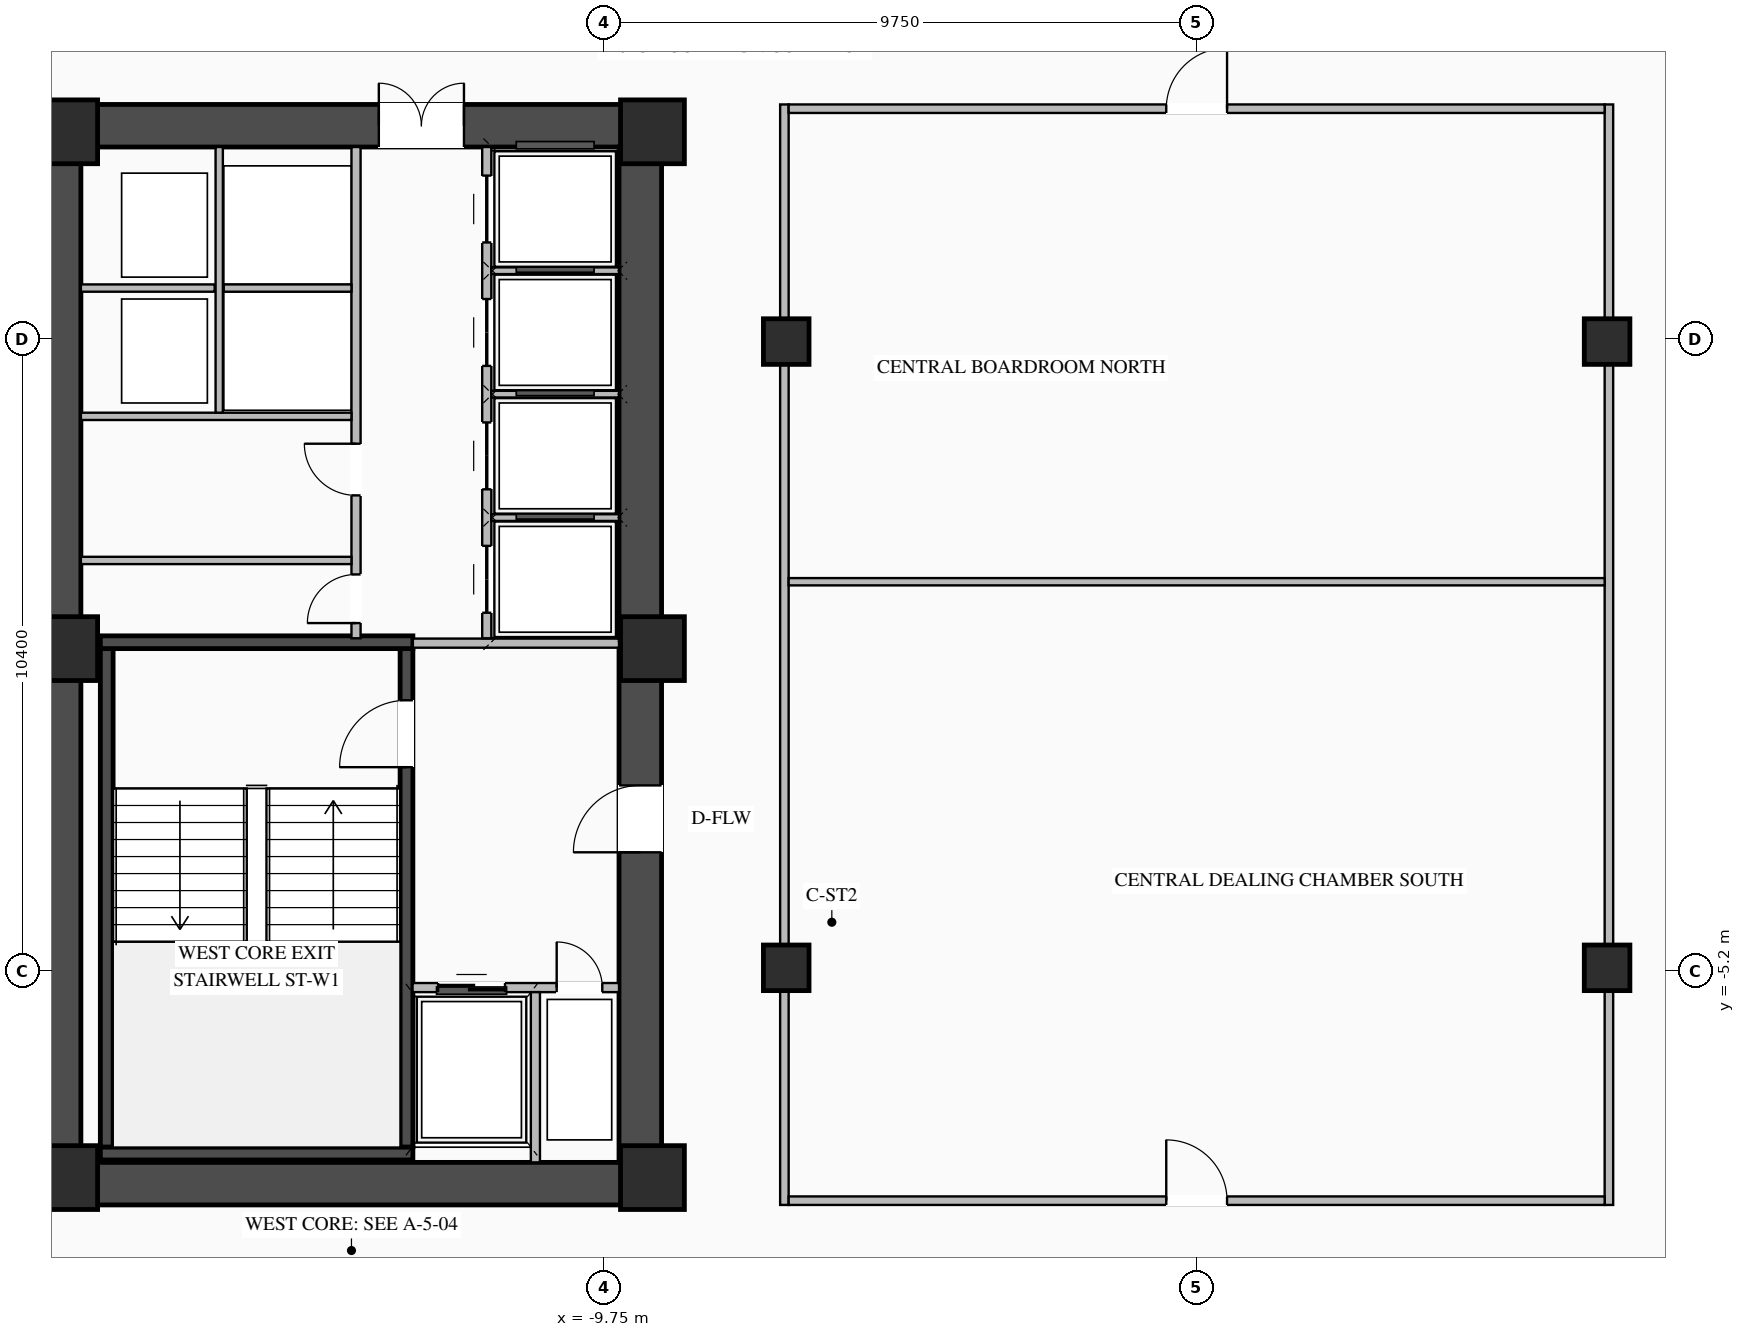
"""IFC4 building model, lengths in metres.
Left out: names, types, materials, properties, quantities, classifications, styles, units other than length and angle.
Written with IfcOpenShell. Run it as: python <this file> out.ifc"""

import sys

from ifc_helpers import new_model, si_unit, direction, frame, frame_2d, origin, origin_2d, place, context, subcontext, project, spatial, rectangle, i_section, extrude, element, fill, save


model = new_model("IFC4")
c1 = context("Model", 3, precision=1e-05, world=origin(), true_north=direction((0.0, 1.0)))
c2 = subcontext(c1, "Body", "Model", "MODEL_VIEW")
j1 = project(units=[si_unit("LENGTHUNIT", "METRE"), si_unit("PLANEANGLEUNIT", "RADIAN")], contexts=[c1])
p1 = place(None, origin())
s1 = spatial("IfcSite", under=j1, at=p1, CompositionType="ELEMENT")
p2 = place(p1, origin())
s2 = spatial("IfcBuilding", under=s1, at=p2, CompositionType="ELEMENT")
p3 = place(p2, frame((0.0, 0.0, 74.2)))
s3 = spatial("IfcBuildingStorey", under=s2, at=p3, CompositionType="ELEMENT", Elevation=74.2)
p4 = place(p3, frame((-19.05, -8.7, 0.0), z_axis=(0.0, 0.0, 1.0), x_axis=(1.0, 0.0, 0.0)))
e1 = element("IfcWall", 1, at=p4, inside=s3, PredefinedType="SHEAR", context=c2, shape_type="SweptSolid", body=[
    extrude(rectangle(XDim=10.25, YDim=0.7, at=frame_2d((5.125, 0.0))), origin(), (0.0, 0.0, 1.0), 3.27),
])
p5 = place(p3, frame((-19.05, 8.7, 0.0), z_axis=(0.0, 0.0, 1.0), x_axis=(1.0, 0.0, 0.0)))
e2 = element("IfcWall", 2, at=p5, inside=s3, PredefinedType="SHEAR", context=c2, shape_type="SweptSolid", body=[
    extrude(rectangle(XDim=10.25, YDim=0.7, at=frame_2d((5.125, 0.0))), origin(), (0.0, 0.0, 1.0), 3.27),
])
p6 = place(p5, frame((5.6, 0.0, 0.0)))
e3 = element("IfcOpeningElement", 3, at=p6, cuts=e2, PredefinedType="OPENING", context=c2, shape_type="SweptSolid", body=[
    extrude(rectangle(XDim=1.4, YDim=2.05, at=frame_2d((0.7, 1.025))), frame((0.0, 0.36, 0.0), z_axis=(0.0, -1.0, 0.0), x_axis=(1.0, 0.0, 0.0)), (0.0, 0.0, 1.0), 0.72),
])
p7 = place(p3, frame((-18.7, -8.35, 0.0), z_axis=(0.0, 0.0, 1.0), x_axis=(0.0, 1.0, 0.0)))
e4 = element("IfcWall", 4, at=p7, inside=s3, PredefinedType="SHEAR", context=c2, shape_type="SweptSolid", body=[
    extrude(rectangle(XDim=16.7, YDim=0.7, at=frame_2d((8.35, 0.0))), origin(), (0.0, 0.0, 1.0), 3.27),
])
p8 = place(p3, frame((-9.15, -8.35, 0.0), z_axis=(0.0, 0.0, 1.0), x_axis=(0.0, 1.0, 0.0)))
e5 = element("IfcWall", 5, at=p8, inside=s3, PredefinedType="SHEAR", context=c2, shape_type="SweptSolid", body=[
    extrude(rectangle(XDim=16.7, YDim=0.7, at=frame_2d((8.35, 0.0))), origin(), (0.0, 0.0, 1.0), 3.27),
])
p9 = place(p8, frame((5.1, 0.0, 0.0)))
e6 = element("IfcOpeningElement", 6, at=p9, cuts=e5, PredefinedType="OPENING", context=c2, shape_type="SweptSolid", body=[
    extrude(rectangle(XDim=1.1, YDim=2.08, at=frame_2d((0.55, 1.04))), frame((0.0, 0.36, 0.0), z_axis=(0.0, -1.0, 0.0), x_axis=(1.0, 0.0, 0.0)), (0.0, 0.0, 1.0), 0.72),
])
p10 = place(p3, frame((-12.995, -8.1, 0.0), z_axis=(0.0, 0.0, 1.0), x_axis=(0.0, 1.0, 0.0)))
e7 = element("IfcWall", 7, at=p10, inside=s3, PredefinedType="SHEAR", context=c2, shape_type="SweptSolid", body=[
    extrude(rectangle(XDim=8.2, YDim=0.21, at=frame_2d((4.1, 0.0))), origin(), (0.0, 0.0, 1.0), 3.27),
])
p11 = place(p10, frame((6.25, 0.0, 0.0)))
e8 = element("IfcOpeningElement", 8, at=p11, cuts=e7, PredefinedType="OPENING", context=c2, shape_type="SweptSolid", body=[
    extrude(rectangle(XDim=1.1, YDim=2.15, at=frame_2d((0.55, 1.075))), frame((0.0, 0.115, 0.0), z_axis=(0.0, -1.0, 0.0), x_axis=(1.0, 0.0, 0.0)), (0.0, 0.0, 1.0), 0.23),
])
p12 = place(p3, frame((-17.925, -8.1, 0.0), z_axis=(0.0, 0.0, 1.0), x_axis=(0.0, 1.0, 0.0)))
e9 = element("IfcWall", 9, at=p12, inside=s3, PredefinedType="SHEAR", context=c2, shape_type="SweptSolid", body=[
    extrude(rectangle(XDim=8.2, YDim=0.21, at=frame_2d((4.1, 0.0))), origin(), (0.0, 0.0, 1.0), 3.27),
])
for number, where, z_axis, x_axis in (
    (10, (-18.03, -8.205, 0.0), (0.0, 0.0, 1.0), (1.0, 0.0, 0.0)),
    (11, (-12.89, 0.205, 0.0), (0.0, 0.0, 1.0), (-1.0, 0.0, 0.0)),
):
    element("IfcWall", number, at=place(p3, frame(where, z_axis=z_axis, x_axis=x_axis)), inside=s3, PredefinedType="SHEAR", context=c2, shape_type="SweptSolid", body=[
        extrude(rectangle(XDim=5.14, YDim=0.21, at=frame_2d((2.57, 0.0))), origin(), (0.0, 0.0, 1.0), 3.27),
    ])
for number, where, z_axis, x_axis in (
    (12, (-8.95, -8.6, 0.0), (0.0, 0.0, 1.0), (1.0, 0.0, 0.0)),
    (13, (-8.95, 0.1, 0.0), (0.0, 0.0, 1.0), (1.0, 0.0, 0.0)),
    (14, (-8.95, 8.6, 0.0), (0.0, 0.0, 1.0), (1.0, 0.0, 0.0)),
    (15, (-18.6, -8.6, 0.0), (0.0, 0.0, 1.0), (1.0, 0.0, 0.0)),
    (16, (-18.6, 0.1, 0.0), (0.0, 0.0, 1.0), (1.0, 0.0, 0.0)),
    (17, (-18.6, 8.6, 0.0), (0.0, 0.0, 1.0), (1.0, 0.0, 0.0)),
):
    element("IfcColumn", number, at=place(p3, frame(where, z_axis=z_axis, x_axis=x_axis)), inside=s3, PredefinedType="COLUMN", context=c2, shape_type="SweptSolid", body=[
        extrude(rectangle(XDim=1.05, YDim=1.05, at=origin_2d()), origin(), (0.0, 0.0, 1.0), 3.45),
    ])
for number, where, z_axis, x_axis in (
    (18, (-6.75, -5.15, 0.0), (0.0, 0.0, 1.0), (1.0, 0.0, 0.0)),
    (19, (-6.75, 5.15, 0.0), (0.0, 0.0, 1.0), (1.0, 0.0, 0.0)),
    (20, (6.75, -5.15, 0.0), (0.0, 0.0, 1.0), (1.0, 0.0, 0.0)),
    (21, (6.75, 5.15, 0.0), (0.0, 0.0, 1.0), (1.0, 0.0, 0.0)),
):
    element("IfcColumn", number, at=place(p3, frame(where, z_axis=z_axis, x_axis=x_axis)), inside=s3, PredefinedType="COLUMN", context=c2, shape_type="SweptSolid", body=[
        extrude(i_section(OverallWidth=0.75, OverallDepth=0.75, WebThickness=0.03, FlangeThickness=0.044, at=origin_2d()), origin(), (0.0, 0.0, 1.0), 3.45),
    ])
p13 = place(p3, frame((-12.895, -5.475, 0.0), z_axis=(0.0, 0.0, 1.0), x_axis=(1.0, 0.0, 0.0)))
e22 = element("IfcWall", 22, at=p13, inside=s3, PredefinedType="STANDARD", context=c2, shape_type="SweptSolid", body=[
    extrude(rectangle(XDim=3.395, YDim=0.15, at=frame_2d((1.698, 0.0))), origin(), (0.0, 0.0, 1.0), 3.25),
])
p14 = place(p13, frame((0.42, 0.0, 0.0)))
e23 = element("IfcOpeningElement", 23, at=p14, cuts=e22, PredefinedType="OPENING", context=c2, shape_type="SweptSolid", body=[
    extrude(rectangle(XDim=1.1, YDim=2.15, at=frame_2d((0.55, 1.075))), frame((0.0, 0.085, 0.0), z_axis=(0.0, -1.0, 0.0), x_axis=(1.0, 0.0, 0.0)), (0.0, 0.0, 1.0), 0.17),
])
p15 = place(p13, frame((2.37, 0.0, 0.0)))
e24 = element("IfcOpeningElement", 24, at=p15, cuts=e22, PredefinedType="OPENING", context=c2, shape_type="SweptSolid", body=[
    extrude(rectangle(XDim=0.75, YDim=2.05, at=frame_2d((0.375, 1.025))), frame((0.0, 0.085, 0.0), z_axis=(0.0, -1.0, 0.0), x_axis=(1.0, 0.0, 0.0)), (0.0, 0.0, 1.0), 0.17),
])
p16 = place(p3, frame((-10.875, -8.35, 0.0), z_axis=(0.0, 0.0, 1.0), x_axis=(0.0, 1.0, 0.0)))
e25 = element("IfcWall", 25, at=p16, inside=s3, PredefinedType="STANDARD", context=c2, shape_type="SweptSolid", body=[
    extrude(rectangle(XDim=2.8, YDim=0.15, at=frame_2d((1.4, 0.0))), origin(), (0.0, 0.0, 1.0), 3.25),
])
p17 = place(p3, frame((-12.89, 0.19, 0.0), z_axis=(0.0, 0.0, 1.0), x_axis=(1.0, 0.0, 0.0)))
e26 = element("IfcWall", 26, at=p17, inside=s3, PredefinedType="STANDARD", context=c2, shape_type="SweptSolid", body=[
    extrude(rectangle(XDim=3.39, YDim=0.15, at=frame_2d((1.695, 0.0))), origin(), (0.0, 0.0, 1.0), 2.645),
])
p18 = place(p3, frame((-11.675, 0.27, 0.0), z_axis=(0.0, 0.0, 1.0), x_axis=(0.0, 1.0, 0.0)))
e27 = element("IfcWall", 27, at=p18, inside=s3, PredefinedType="STANDARD", context=c2, shape_type="SweptSolid", body=[
    extrude(rectangle(XDim=8.08, YDim=0.15, at=frame_2d((4.04, 0.0))), origin(), (0.0, 0.0, 1.0), 3.25),
])
p19 = place(p18, frame((0.42, 0.0, 0.0)))
e28 = element("IfcOpeningElement", 28, at=p19, cuts=e27, PredefinedType="OPENING", context=c2, shape_type="SweptSolid", body=[
    extrude(rectangle(XDim=1.1, YDim=2.1, at=frame_2d((0.55, 1.05))), frame((0.0, 0.085, 0.0), z_axis=(0.0, -1.0, 0.0), x_axis=(1.0, 0.0, 0.0)), (0.0, 0.0, 1.0), 0.17),
])
p20 = place(p18, frame((2.45, 0.0, 0.0)))
e29 = element("IfcOpeningElement", 29, at=p20, cuts=e27, PredefinedType="OPENING", context=c2, shape_type="SweptSolid", body=[
    extrude(rectangle(XDim=1.1, YDim=2.1, at=frame_2d((0.55, 1.05))), frame((0.0, 0.085, 0.0), z_axis=(0.0, -1.0, 0.0), x_axis=(1.0, 0.0, 0.0)), (0.0, 0.0, 1.0), 0.17),
])
p21 = place(p18, frame((4.48, 0.0, 0.0)))
e30 = element("IfcOpeningElement", 30, at=p21, cuts=e27, PredefinedType="OPENING", context=c2, shape_type="SweptSolid", body=[
    extrude(rectangle(XDim=1.1, YDim=2.1, at=frame_2d((0.55, 1.05))), frame((0.0, 0.085, 0.0), z_axis=(0.0, -1.0, 0.0), x_axis=(1.0, 0.0, 0.0)), (0.0, 0.0, 1.0), 0.17),
])
p22 = place(p18, frame((6.51, 0.0, 0.0)))
e31 = element("IfcOpeningElement", 31, at=p22, cuts=e27, PredefinedType="OPENING", context=c2, shape_type="SweptSolid", body=[
    extrude(rectangle(XDim=1.1, YDim=2.1, at=frame_2d((0.55, 1.05))), frame((0.0, 0.085, 0.0), z_axis=(0.0, -1.0, 0.0), x_axis=(1.0, 0.0, 0.0)), (0.0, 0.0, 1.0), 0.17),
])
for number, where, z_axis, x_axis in (
    (32, (-11.6, 2.255, 0.0), (0.0, 0.0, 1.0), (1.0, 0.0, 0.0)),
    (33, (-11.6, 4.285, 0.0), (0.0, 0.0, 1.0), (1.0, 0.0, 0.0)),
    (34, (-11.6, 6.315, 0.0), (0.0, 0.0, 1.0), (1.0, 0.0, 0.0)),
):
    element("IfcWall", number, at=place(p3, frame(where, z_axis=z_axis, x_axis=x_axis)), inside=s3, PredefinedType="STANDARD", context=c2, shape_type="SweptSolid", body=[
        extrude(rectangle(XDim=2.1, YDim=0.11, at=frame_2d((1.05, 0.0))), origin(), (0.0, 0.0, 1.0), 3.25),
    ])
p23 = place(p3, frame((-13.825, 0.27, 0.0), z_axis=(0.0, 0.0, 1.0), x_axis=(0.0, 1.0, 0.0)))
e35 = element("IfcWall", 35, at=p23, inside=s3, PredefinedType="STANDARD", context=c2, shape_type="SweptSolid", body=[
    extrude(rectangle(XDim=8.08, YDim=0.15, at=frame_2d((4.04, 0.0))), origin(), (0.0, 0.0, 1.0), 3.25),
])
p24 = place(p23, frame((0.25, 0.0, 0.0)))
e36 = element("IfcOpeningElement", 36, at=p24, cuts=e35, PredefinedType="OPENING", context=c2, shape_type="SweptSolid", body=[
    extrude(rectangle(XDim=0.8, YDim=2.05, at=frame_2d((0.4, 1.025))), frame((0.0, 0.085, 0.0), z_axis=(0.0, -1.0, 0.0), x_axis=(1.0, 0.0, 0.0)), (0.0, 0.0, 1.0), 0.17),
])
p25 = place(p23, frame((2.35, 0.0, 0.0)))
e37 = element("IfcOpeningElement", 37, at=p25, cuts=e35, PredefinedType="OPENING", context=c2, shape_type="SweptSolid", body=[
    extrude(rectangle(XDim=0.85, YDim=2.05, at=frame_2d((0.425, 1.025))), frame((0.0, 0.085, 0.0), z_axis=(0.0, -1.0, 0.0), x_axis=(1.0, 0.0, 0.0)), (0.0, 0.0, 1.0), 0.17),
])
p26 = place(p3, frame((-18.35, 3.92, 0.0), z_axis=(0.0, 0.0, 1.0), x_axis=(1.0, 0.0, 0.0)))
e38 = element("IfcWall", 38, at=p26, inside=s3, PredefinedType="STANDARD", context=c2, shape_type="SweptSolid", body=[
    extrude(rectangle(XDim=4.45, YDim=0.12, at=frame_2d((2.225, 0.0))), origin(), (0.0, 0.0, 1.0), 3.25),
])
p27 = place(p3, frame((-18.35, 6.03, 0.0), z_axis=(0.0, 0.0, 1.0), x_axis=(1.0, 0.0, 0.0)))
e39 = element("IfcWall", 39, at=p27, inside=s3, PredefinedType="STANDARD", context=c2, shape_type="SweptSolid", body=[
    extrude(rectangle(XDim=2.2, YDim=0.12, at=frame_2d((1.1, 0.0))), origin(), (0.0, 0.0, 1.0), 3.25),
])
p28 = place(p3, frame((-16.075, 3.98, 0.0), z_axis=(0.0, 0.0, 1.0), x_axis=(0.0, 1.0, 0.0)))
e40 = element("IfcWall", 40, at=p28, inside=s3, PredefinedType="STANDARD", context=c2, shape_type="SweptSolid", body=[
    extrude(rectangle(XDim=4.37, YDim=0.12, at=frame_2d((2.185, 0.0))), origin(), (0.0, 0.0, 1.0), 3.25),
])
p29 = place(p3, frame((-16.0, 6.03, 0.0), z_axis=(0.0, 0.0, 1.0), x_axis=(1.0, 0.0, 0.0)))
e41 = element("IfcWall", 41, at=p29, inside=s3, PredefinedType="STANDARD", context=c2, shape_type="SweptSolid", body=[
    extrude(rectangle(XDim=2.1, YDim=0.12, at=frame_2d((1.05, 0.0))), origin(), (0.0, 0.0, 1.0), 3.25),
])
p30 = place(p3, frame((-18.35, 1.55, 0.0), z_axis=(0.0, 0.0, 1.0), x_axis=(1.0, 0.0, 0.0)))
e42 = element("IfcWall", 42, at=p30, inside=s3, PredefinedType="STANDARD", context=c2, shape_type="SweptSolid", body=[
    extrude(rectangle(XDim=4.45, YDim=0.12, at=frame_2d((2.225, 0.0))), origin(), (0.0, 0.0, 1.0), 3.25),
])
for number, where, z_axis, x_axis in (
    (43, (-6.78, -9.05, 0.0), (0.0, 0.0, 1.0), (0.0, 1.0, 0.0)),
    (44, (6.78, -9.05, 0.0), (0.0, 0.0, 1.0), (0.0, 1.0, 0.0)),
):
    element("IfcWall", number, at=place(p3, frame(where, z_axis=z_axis, x_axis=x_axis)), inside=s3, PredefinedType="STANDARD", context=c2, shape_type="SweptSolid", body=[
        extrude(rectangle(XDim=18.1, YDim=0.14, at=frame_2d((9.05, 0.0))), origin(), (0.0, 0.0, 1.0), 2.645),
    ])
p31 = place(p3, frame((-6.71, -8.98, 0.0), z_axis=(0.0, 0.0, 1.0), x_axis=(1.0, 0.0, 0.0)))
e45 = element("IfcWall", 45, at=p31, inside=s3, PredefinedType="STANDARD", context=c2, shape_type="SweptSolid", body=[
    extrude(rectangle(XDim=13.42, YDim=0.14, at=frame_2d((6.71, 0.0))), origin(), (0.0, 0.0, 1.0), 3.25),
])
p32 = place(p31, frame((6.21, 0.0, 0.0)))
e46 = element("IfcOpeningElement", 46, at=p32, cuts=e45, PredefinedType="OPENING", context=c2, shape_type="SweptSolid", body=[
    extrude(rectangle(XDim=1.0, YDim=2.08, at=frame_2d((0.5, 1.04))), frame((0.0, 0.08, 0.0), z_axis=(0.0, -1.0, 0.0), x_axis=(1.0, 0.0, 0.0)), (0.0, 0.0, 1.0), 0.16),
])
p33 = place(p3, frame((-6.71, 8.98, 0.0), z_axis=(0.0, 0.0, 1.0), x_axis=(1.0, 0.0, 0.0)))
e47 = element("IfcWall", 47, at=p33, inside=s3, PredefinedType="STANDARD", context=c2, shape_type="SweptSolid", body=[
    extrude(rectangle(XDim=13.42, YDim=0.14, at=frame_2d((6.71, 0.0))), origin(), (0.0, 0.0, 1.0), 3.25),
])
p34 = place(p33, frame((6.21, 0.0, 0.0)))
e48 = element("IfcOpeningElement", 48, at=p34, cuts=e47, PredefinedType="OPENING", context=c2, shape_type="SweptSolid", body=[
    extrude(rectangle(XDim=1.0, YDim=2.08, at=frame_2d((0.5, 1.04))), frame((0.0, 0.08, 0.0), z_axis=(0.0, -1.0, 0.0), x_axis=(1.0, 0.0, 0.0)), (0.0, 0.0, 1.0), 0.16),
])
p35 = place(p3, frame((-6.71, 1.2, 0.0), z_axis=(0.0, 0.0, 1.0), x_axis=(1.0, 0.0, 0.0)))
e49 = element("IfcWall", 49, at=p35, inside=s3, PredefinedType="STANDARD", context=c2, shape_type="SweptSolid", body=[
    extrude(rectangle(XDim=13.42, YDim=0.12, at=frame_2d((6.71, 0.0))), origin(), (0.0, 0.0, 1.0), 3.25),
])
p36 = place(p11, origin())
e50 = element("IfcDoor", 50, at=p36, inside=s3, OperationType="SINGLE_SWING_LEFT", PredefinedType="DOOR", context=c2, shape_type="SweptSolid", body=[
    extrude(rectangle(XDim=1.1, YDim=2.15, at=frame_2d((0.55, 1.075))), frame((0.0, 0.025, 0.0), z_axis=(0.0, -1.0, 0.0), x_axis=(1.0, 0.0, 0.0)), (0.0, 0.0, 1.0), 0.05),
])
fill(e8, e50)
p37 = place(p14, origin())
e51 = element("IfcDoor", 51, at=p37, inside=s3, OperationType="DOUBLE_DOOR_SLIDING", PredefinedType="DOOR", context=c2, shape_type="SweptSolid", body=[
    extrude(rectangle(XDim=1.1, YDim=2.15, at=frame_2d((0.55, 1.075))), frame((0.0, 0.025, 0.0), z_axis=(0.0, -1.0, 0.0), x_axis=(1.0, 0.0, 0.0)), (0.0, 0.0, 1.0), 0.05),
])
fill(e23, e51)
p38 = place(p15, origin())
e52 = element("IfcDoor", 52, at=p38, inside=s3, OperationType="SINGLE_SWING_LEFT", PredefinedType="DOOR", context=c2, shape_type="SweptSolid", body=[
    extrude(rectangle(XDim=0.75, YDim=2.05, at=frame_2d((0.375, 1.025))), frame((0.0, 0.025, 0.0), z_axis=(0.0, -1.0, 0.0), x_axis=(1.0, 0.0, 0.0)), (0.0, 0.0, 1.0), 0.05),
])
fill(e24, e52)
p39 = place(p9, origin())
e53 = element("IfcDoor", 53, at=p39, inside=s3, OperationType="SINGLE_SWING_LEFT", PredefinedType="DOOR", context=c2, shape_type="SweptSolid", body=[
    extrude(rectangle(XDim=1.1, YDim=2.08, at=frame_2d((0.55, 1.04))), frame((0.0, 0.305, 0.0), z_axis=(0.0, -1.0, 0.0), x_axis=(1.0, 0.0, 0.0)), (0.0, 0.0, 1.0), 0.05),
])
fill(e6, e53)
p40 = place(p6, origin())
e54 = element("IfcDoor", 54, at=p40, inside=s3, OperationType="DOUBLE_DOOR_SINGLE_SWING", PredefinedType="DOOR", context=c2, shape_type="SweptSolid", body=[
    extrude(rectangle(XDim=1.4, YDim=2.05, at=frame_2d((0.7, 1.025))), frame((0.0, 0.295, 0.0), z_axis=(0.0, -1.0, 0.0), x_axis=(1.0, 0.0, 0.0)), (0.0, 0.0, 1.0), 0.05),
])
fill(e3, e54)
p41 = place(p19, origin())
e55 = element("IfcDoor", 55, at=p41, inside=s3, OperationType="DOUBLE_DOOR_SLIDING", PredefinedType="DOOR", context=c2, shape_type="SweptSolid", body=[
    extrude(rectangle(XDim=1.1, YDim=2.1, at=frame_2d((0.55, 1.05))), frame((0.0, 0.025, 0.0), z_axis=(0.0, -1.0, 0.0), x_axis=(1.0, 0.0, 0.0)), (0.0, 0.0, 1.0), 0.05),
])
fill(e28, e55)
p42 = place(p20, origin())
e56 = element("IfcDoor", 56, at=p42, inside=s3, OperationType="DOUBLE_DOOR_SLIDING", PredefinedType="DOOR", context=c2, shape_type="SweptSolid", body=[
    extrude(rectangle(XDim=1.1, YDim=2.1, at=frame_2d((0.55, 1.05))), frame((0.0, 0.025, 0.0), z_axis=(0.0, -1.0, 0.0), x_axis=(1.0, 0.0, 0.0)), (0.0, 0.0, 1.0), 0.05),
])
fill(e29, e56)
p43 = place(p21, origin())
e57 = element("IfcDoor", 57, at=p43, inside=s3, OperationType="DOUBLE_DOOR_SLIDING", PredefinedType="DOOR", context=c2, shape_type="SweptSolid", body=[
    extrude(rectangle(XDim=1.1, YDim=2.1, at=frame_2d((0.55, 1.05))), frame((0.0, 0.025, 0.0), z_axis=(0.0, -1.0, 0.0), x_axis=(1.0, 0.0, 0.0)), (0.0, 0.0, 1.0), 0.05),
])
fill(e30, e57)
p44 = place(p22, origin())
e58 = element("IfcDoor", 58, at=p44, inside=s3, OperationType="DOUBLE_DOOR_SLIDING", PredefinedType="DOOR", context=c2, shape_type="SweptSolid", body=[
    extrude(rectangle(XDim=1.1, YDim=2.1, at=frame_2d((0.55, 1.05))), frame((0.0, 0.025, 0.0), z_axis=(0.0, -1.0, 0.0), x_axis=(1.0, 0.0, 0.0)), (0.0, 0.0, 1.0), 0.05),
])
fill(e31, e58)
p45 = place(p24, origin())
e59 = element("IfcDoor", 59, at=p45, inside=s3, OperationType="SINGLE_SWING_LEFT", PredefinedType="DOOR", context=c2, shape_type="SweptSolid", body=[
    extrude(rectangle(XDim=0.8, YDim=2.05, at=frame_2d((0.4, 1.025))), frame((0.0, 0.025, 0.0), z_axis=(0.0, -1.0, 0.0), x_axis=(1.0, 0.0, 0.0)), (0.0, 0.0, 1.0), 0.05),
])
fill(e36, e59)
p46 = place(p25, origin())
e60 = element("IfcDoor", 60, at=p46, inside=s3, OperationType="SINGLE_SWING_RIGHT", PredefinedType="DOOR", context=c2, shape_type="SweptSolid", body=[
    extrude(rectangle(XDim=0.85, YDim=2.05, at=frame_2d((0.425, 1.025))), frame((0.0, 0.025, 0.0), z_axis=(0.0, -1.0, 0.0), x_axis=(1.0, 0.0, 0.0)), (0.0, 0.0, 1.0), 0.05),
])
fill(e37, e60)
p47 = place(p32, origin())
e61 = element("IfcDoor", 61, at=p47, inside=s3, OperationType="SINGLE_SWING_LEFT", PredefinedType="DOOR", context=c2, shape_type="SweptSolid", body=[
    extrude(rectangle(XDim=1.0, YDim=2.08, at=frame_2d((0.5, 1.04))), frame((0.0, 0.025, 0.0), z_axis=(0.0, -1.0, 0.0), x_axis=(1.0, 0.0, 0.0)), (0.0, 0.0, 1.0), 0.05),
])
fill(e46, e61)
p48 = place(p34, origin())
e62 = element("IfcDoor", 62, at=p48, inside=s3, OperationType="SINGLE_SWING_RIGHT", PredefinedType="DOOR", context=c2, shape_type="SweptSolid", body=[
    extrude(rectangle(XDim=1.0, YDim=2.08, at=frame_2d((0.5, 1.04))), frame((0.0, 0.025, 0.0), z_axis=(0.0, -1.0, 0.0), x_axis=(1.0, 0.0, 0.0)), (0.0, 0.0, 1.0), 0.05),
])
fill(e48, e62)
save(model, sys.argv[1])
